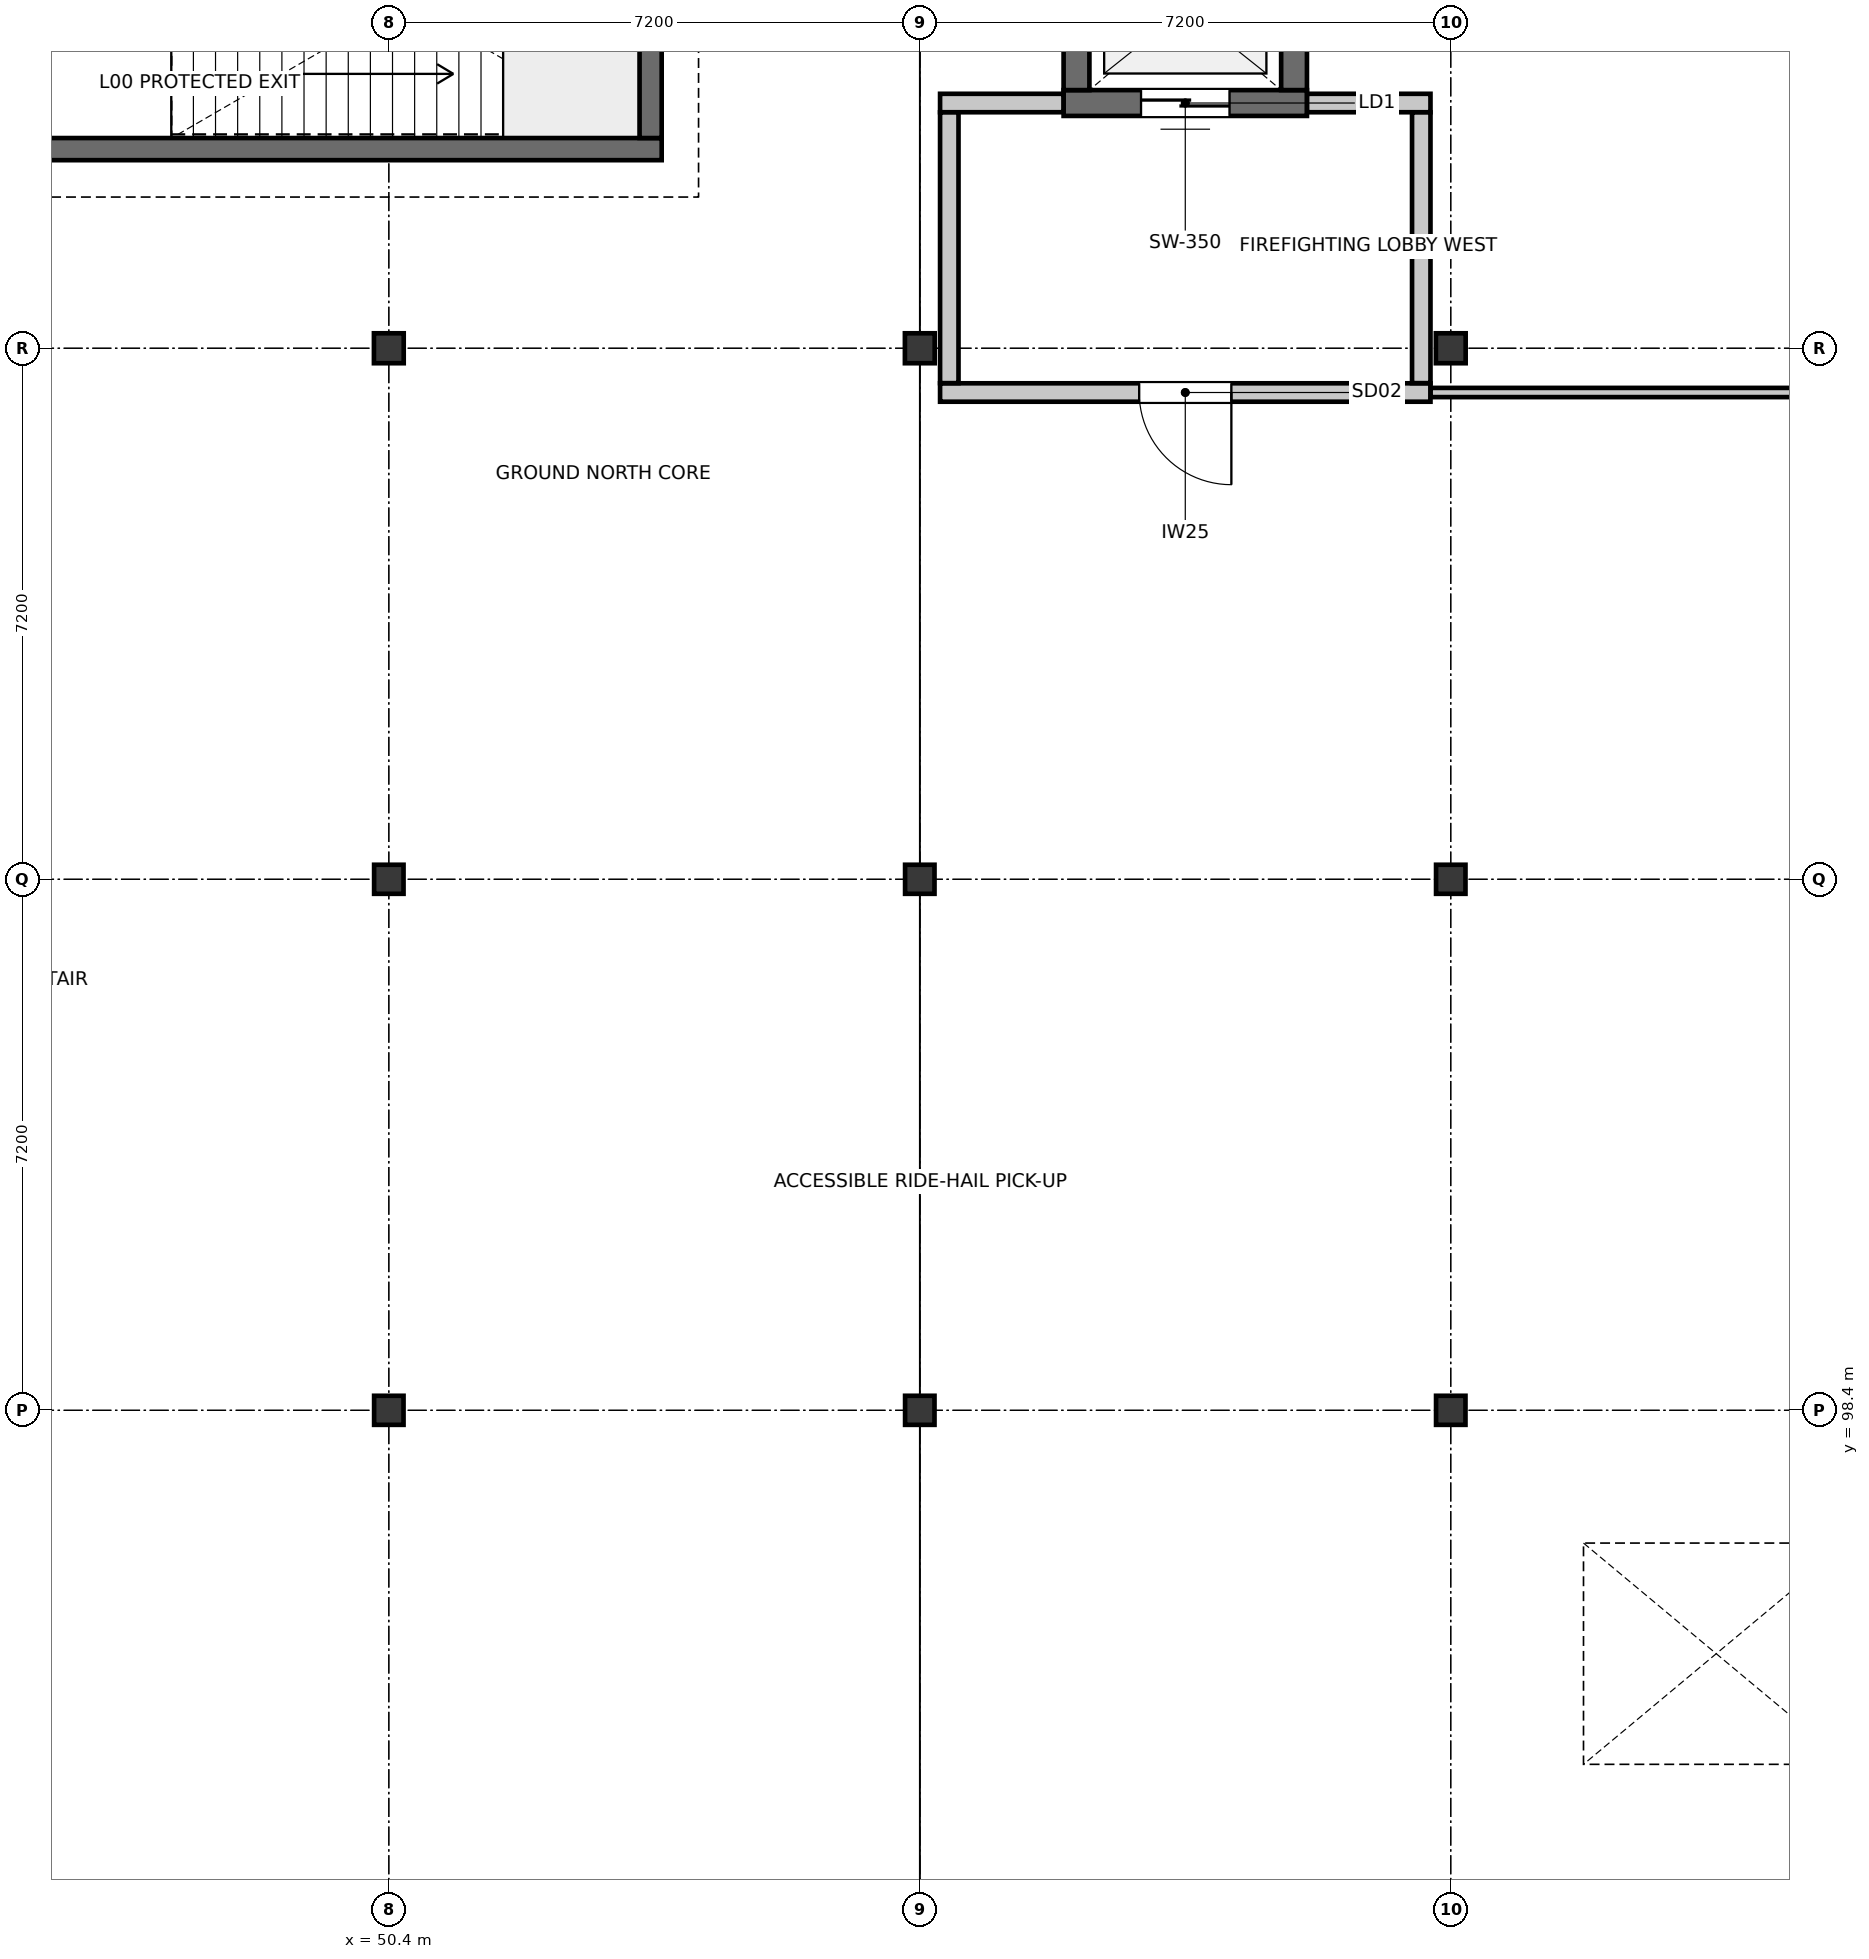
"""IFC4 building model, lengths in metres.
Left out: names, types, materials, properties, quantities, classifications, styles, units other than length and angle.
Written with IfcOpenShell. Run it as: python <this file> out.ifc"""

import sys

from ifc_helpers import new_model, si_unit, direction, frame, frame_2d, origin, origin_2d, place, context, subcontext, project, spatial, rectangle, i_section, extrude, element, fill, save


model = new_model("IFC4")
c1 = context("Model", 3, precision=1e-05, world=origin(), true_north=direction((0.0, 1.0)))
c2 = subcontext(c1, "Body", "Model", "MODEL_VIEW")
j1 = project(units=[si_unit("LENGTHUNIT", "METRE"), si_unit("PLANEANGLEUNIT", "RADIAN")], contexts=[c1])
p1 = place(None, origin())
s1 = spatial("IfcSite", under=j1, at=p1, CompositionType="ELEMENT")
p2 = place(p1, origin())
s2 = spatial("IfcBuilding", under=s1, at=p2, CompositionType="ELEMENT")
p3 = place(p2, origin())
s3 = spatial("IfcBuildingStorey", under=s2, at=p3, CompositionType="ELEMENT", Elevation=0.0)
for number, where, z_axis, x_axis in (
    (1, (50.4, 98.4, 0.0), (0.0, 0.0, 1.0), (1.0, 0.0, 0.0)),
    (2, (50.4, 105.6, 0.0), (0.0, 0.0, 1.0), (1.0, 0.0, 0.0)),
):
    element("IfcColumn", number, at=place(p3, frame(where, z_axis=z_axis, x_axis=x_axis)), inside=s3, PredefinedType="COLUMN", context=c2, shape_type="SweptSolid", body=[
        extrude(i_section(OverallWidth=0.399, OverallDepth=0.394, WebThickness=0.023, FlangeThickness=0.037, FilletRadius=0.015, at=origin_2d()), origin(), (0.0, 0.0, 1.0), 5.4),
    ])
p4 = place(p3, frame((50.4, 112.8, 0.0), z_axis=(0.0, 0.0, 1.0), x_axis=(1.0, 0.0, 0.0)))
e3 = element("IfcColumn", 3, at=p4, inside=s3, PredefinedType="COLUMN", context=c2, shape_type="SweptSolid", body=[
    extrude(i_section(OverallWidth=0.404, OverallDepth=0.406, WebThickness=0.027, FlangeThickness=0.044, FilletRadius=0.015, at=origin_2d()), origin(), (0.0, 0.0, 1.0), 5.4),
])
for number, where, z_axis, x_axis in (
    (4, (57.6, 98.4, 0.0), (0.0, 0.0, 1.0), (1.0, 0.0, 0.0)),
    (5, (57.6, 105.6, 0.0), (0.0, 0.0, 1.0), (1.0, 0.0, 0.0)),
):
    element("IfcColumn", number, at=place(p3, frame(where, z_axis=z_axis, x_axis=x_axis)), inside=s3, PredefinedType="COLUMN", context=c2, shape_type="SweptSolid", body=[
        extrude(i_section(OverallWidth=0.399, OverallDepth=0.394, WebThickness=0.023, FlangeThickness=0.037, FilletRadius=0.015, at=origin_2d()), origin(), (0.0, 0.0, 1.0), 5.4),
    ])
p5 = place(p3, frame((57.6, 112.8, 0.0), z_axis=(0.0, 0.0, 1.0), x_axis=(1.0, 0.0, 0.0)))
e6 = element("IfcColumn", 6, at=p5, inside=s3, PredefinedType="COLUMN", context=c2, shape_type="SweptSolid", body=[
    extrude(i_section(OverallWidth=0.404, OverallDepth=0.406, WebThickness=0.027, FlangeThickness=0.044, FilletRadius=0.015, at=origin_2d()), origin(), (0.0, 0.0, 1.0), 5.4),
])
for number, where, z_axis, x_axis in (
    (7, (64.8, 98.4, 0.0), (0.0, 0.0, 1.0), (1.0, 0.0, 0.0)),
    (8, (64.8, 105.6, 0.0), (0.0, 0.0, 1.0), (1.0, 0.0, 0.0)),
):
    element("IfcColumn", number, at=place(p3, frame(where, z_axis=z_axis, x_axis=x_axis)), inside=s3, PredefinedType="COLUMN", context=c2, shape_type="SweptSolid", body=[
        extrude(i_section(OverallWidth=0.399, OverallDepth=0.394, WebThickness=0.023, FlangeThickness=0.037, FilletRadius=0.015, at=origin_2d()), origin(), (0.0, 0.0, 1.0), 5.4),
    ])
p6 = place(p3, frame((64.8, 112.8, 0.0), z_axis=(0.0, 0.0, 1.0), x_axis=(1.0, 0.0, 0.0)))
e9 = element("IfcColumn", 9, at=p6, inside=s3, PredefinedType="COLUMN", context=c2, shape_type="SweptSolid", body=[
    extrude(i_section(OverallWidth=0.404, OverallDepth=0.406, WebThickness=0.027, FlangeThickness=0.044, FilletRadius=0.015, at=origin_2d()), origin(), (0.0, 0.0, 1.0), 5.4),
])
p7 = place(p3, frame((54.1, 115.5, 0.0), z_axis=(0.0, 0.0, 1.0), x_axis=(-1.0, 0.0, 0.0)))
e10 = element("IfcWall", 10, at=p7, inside=s3, PredefinedType="SOLIDWALL", context=c2, shape_type="SweptSolid", body=[
    extrude(rectangle(XDim=9.4, YDim=0.3, at=frame_2d((4.7, 0.0))), origin(), (0.0, 0.0, 1.0), 5.16),
])
p8 = place(p3, frame((53.95, 119.33, 0.0), z_axis=(0.0, 0.0, 1.0), x_axis=(0.0, -1.0, 0.0)))
e11 = element("IfcWall", 11, at=p8, inside=s3, PredefinedType="SOLIDWALL", context=c2, shape_type="SweptSolid", body=[
    extrude(rectangle(XDim=3.68, YDim=0.3, at=frame_2d((1.84, 0.0))), origin(), (0.0, 0.0, 1.0), 5.16),
])
p9 = place(p3, frame((62.85, 116.125, 0.0), z_axis=(0.0, 0.0, 1.0), x_axis=(-1.0, 0.0, 0.0)))
e12 = element("IfcWall", 12, at=p9, inside=s3, PredefinedType="SHEAR", context=c2, shape_type="SweptSolid", body=[
    extrude(rectangle(XDim=3.3, YDim=0.35, at=frame_2d((1.65, 0.0))), origin(), (0.0, 0.0, 1.0), 5.16),
])
p10 = place(p9, frame((1.05, 0.0, 0.0)))
e13 = element("IfcOpeningElement", 13, at=p10, cuts=e12, PredefinedType="OPENING", context=c2, shape_type="SweptSolid", body=[
    extrude(rectangle(XDim=1.2, YDim=2.2, at=frame_2d((0.6, 1.1))), frame((0.0, 0.185, 0.0), z_axis=(0.0, -1.0, 0.0), x_axis=(1.0, 0.0, 0.0)), (0.0, 0.0, 1.0), 0.37),
])
for number, where, z_axis, x_axis in (
    (14, (59.725, 116.3, 0.0), (0.0, 0.0, 1.0), (0.0, 1.0, 0.0)),
    (15, (62.675, 118.5, 0.0), (0.0, 0.0, 1.0), (0.0, -1.0, 0.0)),
):
    element("IfcWall", number, at=place(p3, frame(where, z_axis=z_axis, x_axis=x_axis)), inside=s3, PredefinedType="SHEAR", context=c2, shape_type="SweptSolid", body=[
        extrude(rectangle(XDim=2.2, YDim=0.35, at=frame_2d((1.1, 0.0))), origin(), (0.0, 0.0, 1.0), 5.16),
    ])
p11 = place(p3, frame((64.525, 112.2, 0.0), z_axis=(0.0, 0.0, 1.0), x_axis=(-1.0, 0.0, 0.0)))
e16 = element("IfcWall", 16, at=p11, inside=s3, PredefinedType="PARTITIONING", context=c2, shape_type="SweptSolid", body=[
    extrude(rectangle(XDim=6.65, YDim=0.25, at=frame_2d((3.325, 0.0))), origin(), (0.0, 0.0, 1.0), 4.457),
])
p12 = place(p11, frame((2.7, 0.0, 0.0)))
e17 = element("IfcOpeningElement", 17, at=p12, cuts=e16, PredefinedType="OPENING", context=c2, shape_type="SweptSolid", body=[
    extrude(rectangle(XDim=1.25, YDim=2.2, at=frame_2d((0.625, 1.1))), frame((0.0, 0.135, 0.0), z_axis=(0.0, -1.0, 0.0), x_axis=(1.0, 0.0, 0.0)), (0.0, 0.0, 1.0), 0.27),
])
p13 = place(p3, frame((57.875, 116.125, 0.0), z_axis=(0.0, 0.0, 1.0), x_axis=(1.0, 0.0, 0.0)))
e18 = element("IfcWall", 18, at=p13, inside=s3, PredefinedType="PARTITIONING", context=c2, shape_type="SweptSolid", body=[
    extrude(rectangle(XDim=1.673, YDim=0.25, at=frame_2d((0.836, 0.0))), origin(), (0.0, 0.0, 1.0), 4.457),
])
p14 = place(p3, frame((62.852, 116.125, 0.0), z_axis=(0.0, 0.0, 1.0), x_axis=(1.0, 0.0, 0.0)))
e19 = element("IfcWall", 19, at=p14, inside=s3, PredefinedType="PARTITIONING", context=c2, shape_type="SweptSolid", body=[
    extrude(rectangle(XDim=1.673, YDim=0.25, at=frame_2d((0.836, 0.0))), origin(), (0.0, 0.0, 1.0), 4.457),
])
for number, where, z_axis, x_axis in (
    (20, (58.0, 112.327, 0.0), (0.0, 0.0, 1.0), (0.0, 1.0, 0.0)),
    (21, (64.4, 115.998, 0.0), (0.0, 0.0, 1.0), (0.0, -1.0, 0.0)),
):
    element("IfcWall", number, at=place(p3, frame(where, z_axis=z_axis, x_axis=x_axis)), inside=s3, PredefinedType="PARTITIONING", context=c2, shape_type="SweptSolid", body=[
        extrude(rectangle(XDim=3.671, YDim=0.25, at=frame_2d((1.835, 0.0))), origin(), (0.0, 0.0, 1.0), 4.457),
    ])
p15 = place(p3, frame((86.48, 112.2, 0.0), z_axis=(0.0, 0.0, 1.0), x_axis=(-1.0, 0.0, 0.0)))
e22 = element("IfcWall", 22, at=p15, inside=s3, PredefinedType="PARTITIONING", context=c2, shape_type="SweptSolid", body=[
    extrude(rectangle(XDim=21.953, YDim=0.125, at=frame_2d((10.977, 0.0))), origin(), (0.0, 0.0, 1.0), 4.457),
])
p16 = place(p15, frame((10.256, 0.0, 0.0)))
e23 = element("IfcOpeningElement", 23, at=p16, cuts=e22, PredefinedType="OPENING", context=c2, shape_type="SweptSolid", body=[
    extrude(rectangle(XDim=1.44, YDim=2.16, at=frame_2d((0.72, 1.08))), frame((0.0, 0.073, 0.0), z_axis=(0.0, -1.0, 0.0), x_axis=(1.0, 0.0, 0.0)), (0.0, 0.0, 1.0), 0.145),
])
p17 = place(p15, frame((15.196, 0.0, 0.95)))
e24 = element("IfcOpeningElement", 24, at=p17, cuts=e22, PredefinedType="OPENING", context=c2, shape_type="SweptSolid", body=[
    extrude(rectangle(XDim=1.75, YDim=1.15, at=frame_2d((0.875, 0.575))), frame((0.0, 0.073, 0.0), z_axis=(0.0, -1.0, 0.0), x_axis=(1.0, 0.0, 0.0)), (0.0, 0.0, 1.0), 0.145),
])
p18 = place(p10, origin())
e25 = element("IfcDoor", 25, at=p18, inside=s3, OperationType="DOUBLE_DOOR_SLIDING", PredefinedType="DOOR", context=c2, shape_type="SweptSolid", body=[
    extrude(rectangle(XDim=1.2, YDim=2.2, at=frame_2d((0.6, 1.1))), frame((0.0, 0.025, 0.0), z_axis=(0.0, -1.0, 0.0), x_axis=(1.0, 0.0, 0.0)), (0.0, 0.0, 1.0), 0.05),
])
fill(e13, e25)
p19 = place(p12, origin())
e26 = element("IfcDoor", 26, at=p19, inside=s3, OperationType="SINGLE_SWING_LEFT", PredefinedType="DOOR", context=c2, shape_type="SweptSolid", body=[
    extrude(rectangle(XDim=1.25, YDim=2.2, at=frame_2d((0.625, 1.1))), frame((0.0, 0.025, 0.0), z_axis=(0.0, -1.0, 0.0), x_axis=(1.0, 0.0, 0.0)), (0.0, 0.0, 1.0), 0.05),
])
fill(e17, e26)
save(model, sys.argv[1])
